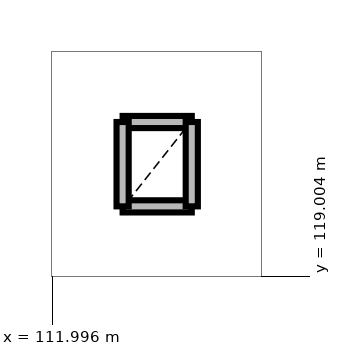
"""IFC4 building model, lengths in metres.
Left out: names, types, materials, properties, quantities, classifications, styles, units other than length and angle.
Written with IfcOpenShell. Run it as: python <this file> out.ifc"""

import sys

from ifc_helpers import new_model, si_unit, direction, frame, frame_2d, origin, place, context, subcontext, project, spatial, rectangle, extrude, element, save


model = new_model("IFC4")
c1 = context("Model", 3, precision=1e-05, world=origin(), true_north=direction((0.0, 1.0)))
c2 = subcontext(c1, "Body", "Model", "MODEL_VIEW")
j1 = project(units=[si_unit("LENGTHUNIT", "METRE"), si_unit("PLANEANGLEUNIT", "RADIAN")], contexts=[c1])
p1 = place(None, origin())
s1 = spatial("IfcSite", under=j1, at=p1, CompositionType="ELEMENT")
p2 = place(p1, origin())
s2 = spatial("IfcBuilding", under=s1, at=p2, CompositionType="ELEMENT")
p3 = place(p2, origin())
s3 = spatial("IfcBuildingStorey", under=s2, at=p3, CompositionType="ELEMENT", Elevation=0.0)
for number, where, z_axis, x_axis in (
    (1, (112.92, 119.92, 0.0), (0.0, 0.0, 1.0), (1.0, 0.0, 0.0)),
    (2, (113.83, 121.03, 0.0), (0.0, 0.0, 1.0), (-1.0, 0.0, 0.0)),
):
    element("IfcWall", number, at=place(p3, frame(where, z_axis=z_axis, x_axis=x_axis)), inside=s3, PredefinedType="PARTITIONING", context=c2, shape_type="SweptSolid", body=[
        extrude(rectangle(XDim=0.91, YDim=0.16, at=frame_2d((0.455, 0.0))), origin(), (0.0, 0.0, 1.0), 4.55),
    ])
for number, where, z_axis, x_axis in (
    (3, (112.92, 121.03, 0.0), (0.0, 0.0, 1.0), (0.0, -1.0, 0.0)),
    (4, (113.83, 119.92, 0.0), (0.0, 0.0, 1.0), (0.0, 1.0, 0.0)),
):
    element("IfcWall", number, at=place(p3, frame(where, z_axis=z_axis, x_axis=x_axis)), inside=s3, PredefinedType="PARTITIONING", context=c2, shape_type="SweptSolid", body=[
        extrude(rectangle(XDim=1.11, YDim=0.16, at=frame_2d((0.555, 0.0))), origin(), (0.0, 0.0, 1.0), 4.55),
    ])
save(model, sys.argv[1])
